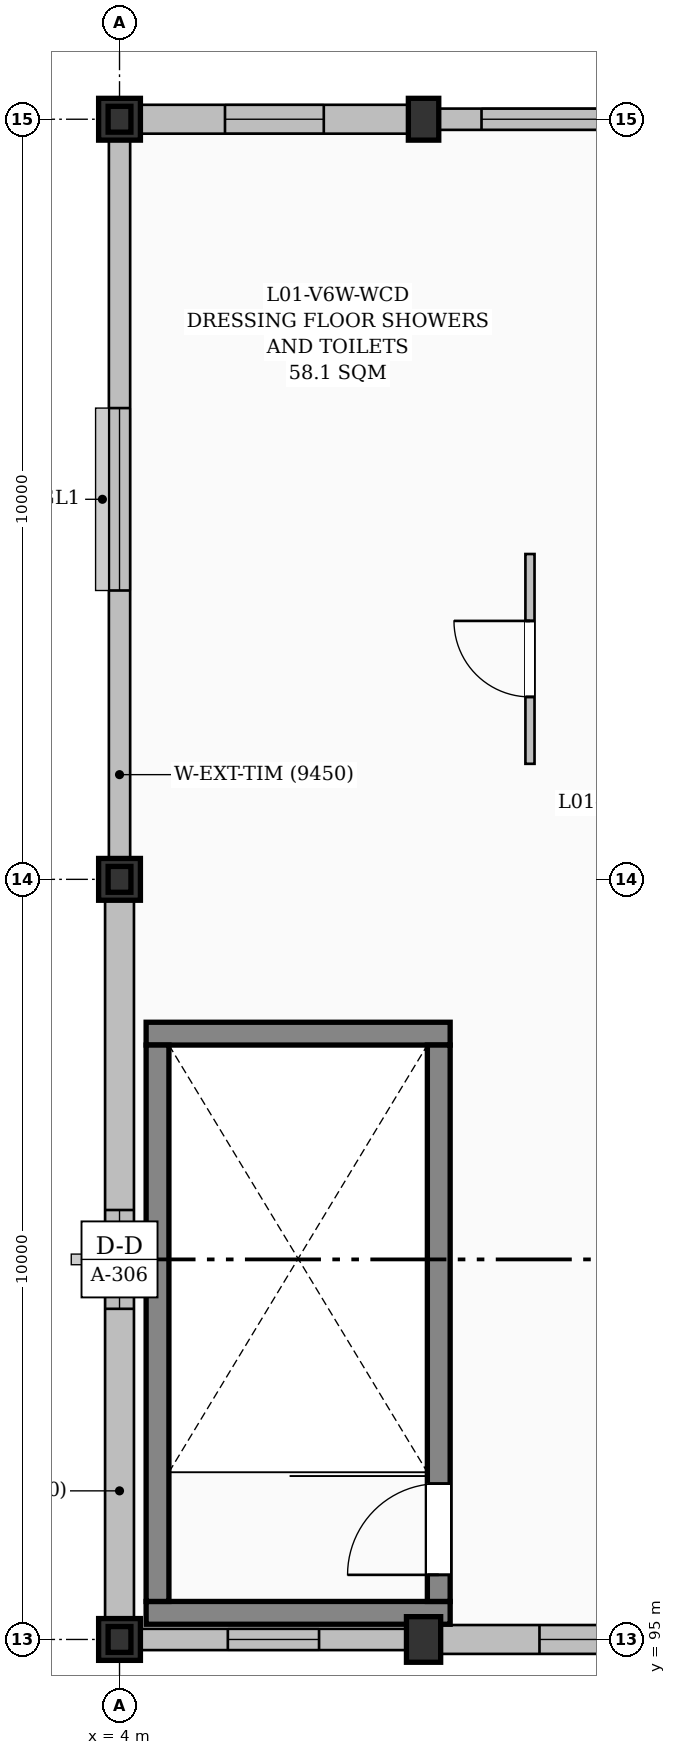
"""IFC4 building model, lengths in metres.
Left out: names, types, materials, properties, quantities, classifications, styles, units other than length and angle.
Written with IfcOpenShell. Run it as: python <this file> out.ifc"""

import sys

from ifc_helpers import new_model, si_unit, direction, frame, frame_2d, origin, origin_2d, place, context, subcontext, project, spatial, rectangle, i_section, extrude, element, fill, save


model = new_model("IFC4")
c1 = context("Model", 3, precision=1e-05, world=origin(), true_north=direction((0.0, 1.0)))
c2 = subcontext(c1, "Body", "Model", "MODEL_VIEW")
j1 = project(units=[si_unit("LENGTHUNIT", "METRE"), si_unit("PLANEANGLEUNIT", "RADIAN")], contexts=[c1])
p1 = place(None, origin())
s1 = spatial("IfcSite", under=j1, at=p1, CompositionType="ELEMENT")
p2 = place(p1, origin())
s2 = spatial("IfcBuilding", under=s1, at=p2, CompositionType="ELEMENT")
p3 = place(p2, frame((0.0, 0.0, 4.8)))
s3 = spatial("IfcBuildingStorey", under=s2, at=p3, CompositionType="ELEMENT", Elevation=4.8)
for number, where, z_axis, x_axis in (
    (1, (4.0, 95.0, 0.0), (0.0, 0.0, 1.0), (1.0, 0.0, 0.0)),
    (2, (4.0, 105.0, 0.0), (0.0, 0.0, 1.0), (1.0, 0.0, 0.0)),
    (3, (4.0, 115.0, 0.0), (0.0, 0.0, 1.0), (1.0, 0.0, 0.0)),
):
    element("IfcColumn", number, at=place(p3, frame(where, z_axis=z_axis, x_axis=x_axis)), inside=s3, PredefinedType="COLUMN", context=c2, shape_type="SweptSolid", body=[
        extrude(rectangle(XDim=0.55, YDim=0.55, at=origin_2d()), origin(), (0.0, 0.0, 1.0), 4.5),
    ])
p4 = place(p3, frame((8.0, 95.0, 0.0), z_axis=(0.0, 0.0, 1.0), x_axis=(1.0, 0.0, 0.0)))
e4 = element("IfcColumn", 4, at=p4, inside=s3, PredefinedType="PILASTER", context=c2, shape_type="SweptSolid", body=[
    extrude(rectangle(XDim=0.45, YDim=0.6, at=origin_2d()), origin(), (0.0, 0.0, 1.0), 4.5),
])
p5 = place(p3, frame((8.0, 115.0, 0.0), z_axis=(0.0, 0.0, 1.0), x_axis=(1.0, 0.0, 0.0)))
e5 = element("IfcColumn", 5, at=p5, inside=s3, PredefinedType="PILASTER", context=c2, shape_type="SweptSolid", body=[
    extrude(rectangle(XDim=0.4, YDim=0.55, at=origin_2d()), origin(), (0.0, 0.0, 1.0), 4.5),
])
for number, where, z_axis, x_axis in (
    (6, (4.0, 95.0, 4.5), (0.0, 0.0, 1.0), (1.0, 0.0, 0.0)),
    (7, (4.0, 115.0, 4.5), (0.0, 0.0, 1.0), (1.0, 0.0, 0.0)),
    (8, (4.0, 105.0, 4.5), (0.0, 0.0, 1.0), (1.0, 0.0, 0.0)),
):
    element("IfcColumn", number, at=place(p3, frame(where, z_axis=z_axis, x_axis=x_axis)), inside=s3, PredefinedType="COLUMN", context=c2, shape_type="SweptSolid", body=[
        extrude(i_section(OverallWidth=0.3, OverallDepth=0.34, WebThickness=0.012, FlangeThickness=0.021, FilletRadius=0.027, at=origin_2d()), origin(), (0.0, 0.0, 1.0), 1.342),
    ])
p6 = place(p3, frame((4.0, 95.275, 0.0), z_axis=(0.0, 0.0, 1.0), x_axis=(0.0, 1.0, 0.0)))
e9 = element("IfcWall", 9, at=p6, inside=s3, PredefinedType="SOLIDWALL", context=c2, shape_type="SweptSolid", body=[
    extrude(rectangle(XDim=9.45, YDim=0.38, at=frame_2d((4.725, 0.0))), origin(), (0.0, 0.0, 1.0), 3.585),
])
p7 = place(p6, frame((4.075, 0.0, 0.95)))
e10 = element("IfcOpeningElement", 10, at=p7, cuts=e9, PredefinedType="OPENING", context=c2, shape_type="SweptSolid", body=[
    extrude(rectangle(XDim=1.3, YDim=1.4, at=frame_2d((0.65, 0.7))), frame((0.0, 0.2, 0.0), z_axis=(0.0, -1.0, 0.0), x_axis=(1.0, 0.0, 0.0)), (0.0, 0.0, 1.0), 0.4),
])
p8 = place(p3, frame((4.0, 105.275, 0.0), z_axis=(0.0, 0.0, 1.0), x_axis=(0.0, 1.0, 0.0)))
e11 = element("IfcWall", 11, at=p8, inside=s3, PredefinedType="SOLIDWALL", context=c2, shape_type="SweptSolid", body=[
    extrude(rectangle(XDim=9.45, YDim=0.28, at=frame_2d((4.725, 0.0))), origin(), (0.0, 0.0, 1.0), 3.585),
])
p9 = place(p8, frame((3.525, 0.0, 0.95)))
e12 = element("IfcOpeningElement", 12, at=p9, cuts=e11, PredefinedType="OPENING", context=c2, shape_type="SweptSolid", body=[
    extrude(rectangle(XDim=2.4, YDim=1.2, at=frame_2d((1.2, 0.6))), frame((0.0, 0.15, 0.0), z_axis=(0.0, -1.0, 0.0), x_axis=(1.0, 0.0, 0.0)), (0.0, 0.0, 1.0), 0.3),
])
p10 = place(p3, frame((4.275, 115.0, 0.0), z_axis=(0.0, 0.0, 1.0), x_axis=(1.0, 0.0, 0.0)))
e13 = element("IfcWall", 13, at=p10, inside=s3, PredefinedType="SOLIDWALL", context=c2, shape_type="SweptSolid", body=[
    extrude(rectangle(XDim=3.525, YDim=0.38, at=frame_2d((1.763, 0.0))), origin(), (0.0, 0.0, 1.0), 4.125),
])
p11 = place(p10, frame((1.113, 0.0, 0.95)))
e14 = element("IfcOpeningElement", 14, at=p11, cuts=e13, PredefinedType="OPENING", context=c2, shape_type="SweptSolid", body=[
    extrude(rectangle(XDim=1.3, YDim=1.4, at=frame_2d((0.65, 0.7))), frame((0.0, 0.2, 0.0), z_axis=(0.0, -1.0, 0.0), x_axis=(1.0, 0.0, 0.0)), (0.0, 0.0, 1.0), 0.4),
])
p12 = place(p3, frame((8.2, 115.0, 0.0), z_axis=(0.0, 0.0, 1.0), x_axis=(1.0, 0.0, 0.0)))
e15 = element("IfcWall", 15, at=p12, inside=s3, PredefinedType="SOLIDWALL", context=c2, shape_type="SweptSolid", body=[
    extrude(rectangle(XDim=3.525, YDim=0.28, at=frame_2d((1.763, 0.0))), origin(), (0.0, 0.0, 1.0), 4.125),
])
p13 = place(p12, frame((0.562, 0.0, 0.95)))
e16 = element("IfcOpeningElement", 16, at=p13, cuts=e15, PredefinedType="OPENING", context=c2, shape_type="SweptSolid", body=[
    extrude(rectangle(XDim=2.4, YDim=1.2, at=frame_2d((1.2, 0.6))), frame((0.0, 0.15, 0.0), z_axis=(0.0, -1.0, 0.0), x_axis=(1.0, 0.0, 0.0)), (0.0, 0.0, 1.0), 0.3),
])
p14 = place(p3, frame((11.725, 95.0, 0.0), z_axis=(0.0, 0.0, 1.0), x_axis=(-1.0, 0.0, 0.0)))
e17 = element("IfcWall", 17, at=p14, inside=s3, PredefinedType="SOLIDWALL", context=c2, shape_type="SweptSolid", body=[
    extrude(rectangle(XDim=3.5, YDim=0.38, at=frame_2d((1.75, 0.0))), origin(), (0.0, 0.0, 1.0), 4.125),
])
p15 = place(p14, frame((1.3, 0.0, 0.95)))
e18 = element("IfcOpeningElement", 18, at=p15, cuts=e17, PredefinedType="OPENING", context=c2, shape_type="SweptSolid", body=[
    extrude(rectangle(XDim=0.9, YDim=1.8, at=frame_2d((0.45, 0.9))), frame((0.0, 0.2, 0.0), z_axis=(0.0, -1.0, 0.0), x_axis=(1.0, 0.0, 0.0)), (0.0, 0.0, 1.0), 0.4),
])
p16 = place(p3, frame((7.775, 95.0, 0.0), z_axis=(0.0, 0.0, 1.0), x_axis=(-1.0, 0.0, 0.0)))
e19 = element("IfcWall", 19, at=p16, inside=s3, PredefinedType="SOLIDWALL", context=c2, shape_type="SweptSolid", body=[
    extrude(rectangle(XDim=3.5, YDim=0.28, at=frame_2d((1.75, 0.0))), origin(), (0.0, 0.0, 1.0), 4.125),
])
p17 = place(p16, frame((1.15, 0.0, 0.95)))
e20 = element("IfcOpeningElement", 20, at=p17, cuts=e19, PredefinedType="OPENING", context=c2, shape_type="SweptSolid", body=[
    extrude(rectangle(XDim=1.2, YDim=1.8, at=frame_2d((0.6, 0.9))), frame((0.0, 0.15, 0.0), z_axis=(0.0, -1.0, 0.0), x_axis=(1.0, 0.0, 0.0)), (0.0, 0.0, 1.0), 0.3),
])
for number, where, z_axis, x_axis in (
    (21, (4.35, 95.35, 0.0), (0.0, 0.0, 1.0), (1.0, 0.0, 0.0)),
    (22, (8.35, 102.97, 0.0), (0.0, 0.0, 1.0), (-1.0, 0.0, 0.0)),
):
    element("IfcWall", number, at=place(p3, frame(where, z_axis=z_axis, x_axis=x_axis)), inside=s3, PredefinedType="SHEAR", context=c2, shape_type="SweptSolid", body=[
        extrude(rectangle(XDim=4.0, YDim=0.3, at=frame_2d((2.0, 0.0))), origin(), (0.0, 0.0, 1.0), 4.25),
    ])
p18 = place(p3, frame((4.5, 95.5, 0.0), z_axis=(0.0, 0.0, 1.0), x_axis=(0.0, 1.0, 0.0)))
e23 = element("IfcWall", 23, at=p18, inside=s3, PredefinedType="SHEAR", context=c2, shape_type="SweptSolid", body=[
    extrude(rectangle(XDim=7.32, YDim=0.3, at=frame_2d((3.66, 0.0))), origin(), (0.0, 0.0, 1.0), 4.25),
])
p19 = place(p3, frame((8.2, 95.5, 0.0), z_axis=(0.0, 0.0, 1.0), x_axis=(0.0, 1.0, 0.0)))
e24 = element("IfcWall", 24, at=p19, inside=s3, PredefinedType="SHEAR", context=c2, shape_type="SweptSolid", body=[
    extrude(rectangle(XDim=7.32, YDim=0.3, at=frame_2d((3.66, 0.0))), origin(), (0.0, 0.0, 1.0), 4.25),
])
p20 = place(p19, frame((0.35, 0.0, 0.0)))
e25 = element("IfcOpeningElement", 25, at=p20, cuts=e24, PredefinedType="OPENING", context=c2, shape_type="SweptSolid", body=[
    extrude(rectangle(XDim=1.2, YDim=2.15, at=frame_2d((0.6, 1.075))), frame((0.0, 0.16, 0.0), z_axis=(0.0, -1.0, 0.0), x_axis=(1.0, 0.0, 0.0)), (0.0, 0.0, 1.0), 0.32),
])
p21 = place(p3, frame((9.4, 106.52, 0.0), z_axis=(0.0, 0.0, 1.0), x_axis=(0.0, 1.0, 0.0)))
e26 = element("IfcWall", 26, at=p21, inside=s3, PredefinedType="PARTITIONING", context=c2, shape_type="SweptSolid", body=[
    extrude(rectangle(XDim=2.76, YDim=0.12, at=frame_2d((1.38, 0.0))), origin(), (0.0, 0.0, 1.0), 4.25),
])
p22 = place(p21, frame((0.88, 0.0, 0.0)))
e27 = element("IfcOpeningElement", 27, at=p22, cuts=e26, PredefinedType="OPENING", context=c2, shape_type="SweptSolid", body=[
    extrude(rectangle(XDim=1.0, YDim=2.1, at=frame_2d((0.5, 1.05))), frame((0.0, 0.07, 0.0), z_axis=(0.0, -1.0, 0.0), x_axis=(1.0, 0.0, 0.0)), (0.0, 0.0, 1.0), 0.14),
])
p23 = place(p7, origin())
e28 = element("IfcWindow", 28, at=p23, inside=s3, PartitioningType="SINGLE_PANEL", PredefinedType="WINDOW", context=c2, shape_type="SweptSolid", body=[
    extrude(rectangle(XDim=1.3, YDim=1.4, at=frame_2d((0.65, 0.7))), frame((0.0, 0.03, 0.0), z_axis=(0.0, -1.0, 0.0), x_axis=(1.0, 0.0, 0.0)), (0.0, 0.0, 1.0), 0.06),
])
fill(e10, e28)
p24 = place(p9, origin())
e29 = element("IfcWindow", 29, at=p24, inside=s3, PartitioningType="TRIPLE_PANEL_HORIZONTAL", PredefinedType="WINDOW", context=c2, shape_type="SweptSolid", body=[
    extrude(rectangle(XDim=2.4, YDim=1.2, at=frame_2d((1.2, 0.6))), frame((0.0, 0.03, 0.0), z_axis=(0.0, -1.0, 0.0), x_axis=(1.0, 0.0, 0.0)), (0.0, 0.0, 1.0), 0.06),
])
fill(e12, e29)
p25 = place(p11, origin())
e30 = element("IfcWindow", 30, at=p25, inside=s3, PartitioningType="SINGLE_PANEL", PredefinedType="WINDOW", context=c2, shape_type="SweptSolid", body=[
    extrude(rectangle(XDim=1.3, YDim=1.4, at=frame_2d((0.65, 0.7))), frame((0.0, 0.03, 0.0), z_axis=(0.0, -1.0, 0.0), x_axis=(1.0, 0.0, 0.0)), (0.0, 0.0, 1.0), 0.06),
])
fill(e14, e30)
p26 = place(p13, origin())
e31 = element("IfcWindow", 31, at=p26, inside=s3, PartitioningType="TRIPLE_PANEL_HORIZONTAL", PredefinedType="WINDOW", context=c2, shape_type="SweptSolid", body=[
    extrude(rectangle(XDim=2.4, YDim=1.2, at=frame_2d((1.2, 0.6))), frame((0.0, 0.03, 0.0), z_axis=(0.0, -1.0, 0.0), x_axis=(1.0, 0.0, 0.0)), (0.0, 0.0, 1.0), 0.06),
])
fill(e16, e31)
p27 = place(p15, origin())
e32 = element("IfcWindow", 32, at=p27, inside=s3, PartitioningType="SINGLE_PANEL", PredefinedType="WINDOW", context=c2, shape_type="SweptSolid", body=[
    extrude(rectangle(XDim=0.9, YDim=1.8, at=frame_2d((0.45, 0.9))), frame((0.0, 0.03, 0.0), z_axis=(0.0, -1.0, 0.0), x_axis=(1.0, 0.0, 0.0)), (0.0, 0.0, 1.0), 0.06),
])
fill(e18, e32)
p28 = place(p17, origin())
e33 = element("IfcWindow", 33, at=p28, inside=s3, PartitioningType="SINGLE_PANEL", PredefinedType="WINDOW", context=c2, shape_type="SweptSolid", body=[
    extrude(rectangle(XDim=1.2, YDim=1.8, at=frame_2d((0.6, 0.9))), frame((0.0, 0.03, 0.0), z_axis=(0.0, -1.0, 0.0), x_axis=(1.0, 0.0, 0.0)), (0.0, 0.0, 1.0), 0.06),
])
fill(e20, e33)
p29 = place(p20, origin())
e34 = element("IfcDoor", 34, at=p29, inside=s3, OperationType="SINGLE_SWING_LEFT", PredefinedType="DOOR", context=c2, shape_type="SweptSolid", body=[
    extrude(rectangle(XDim=1.2, YDim=2.15, at=frame_2d((0.6, 1.075))), frame((0.0, 0.025, 0.0), z_axis=(0.0, -1.0, 0.0), x_axis=(1.0, 0.0, 0.0)), (0.0, 0.0, 1.0), 0.05),
])
fill(e25, e34)
p30 = place(p22, origin())
e35 = element("IfcDoor", 35, at=p30, inside=s3, OperationType="SINGLE_SWING_RIGHT", PredefinedType="DOOR", context=c2, shape_type="SweptSolid", body=[
    extrude(rectangle(XDim=1.0, YDim=2.1, at=frame_2d((0.5, 1.05))), frame((0.0, 0.025, 0.0), z_axis=(0.0, -1.0, 0.0), x_axis=(1.0, 0.0, 0.0)), (0.0, 0.0, 1.0), 0.05),
])
fill(e27, e35)
save(model, sys.argv[1])
